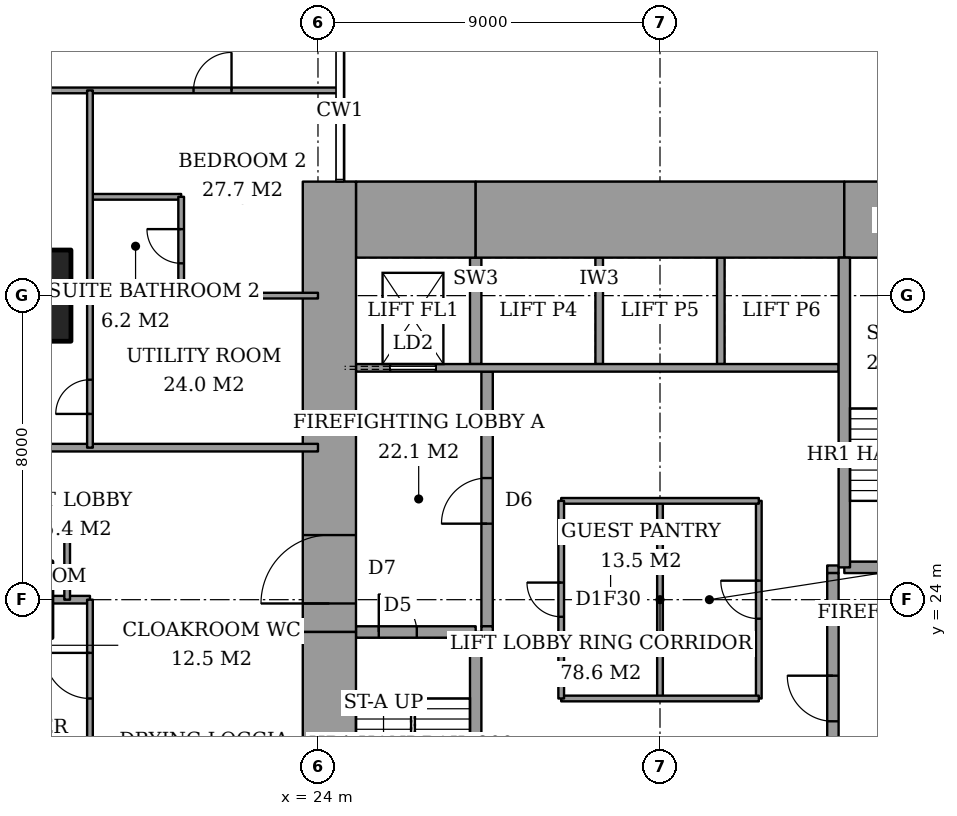
"""IFC4 building model, lengths in metres.
Left out: names, types, materials, properties, quantities, classifications, styles, units other than length and angle.
Written with IfcOpenShell. Run it as: python <this file> out.ifc"""

import sys

from ifc_helpers import new_model, si_unit, direction, frame, frame_2d, origin, origin_2d, place, context, subcontext, project, spatial, rectangle, extrude, element, fill, save


model = new_model("IFC4")
c1 = context("Model", 3, precision=1e-05, world=origin(), true_north=direction((0.0, 1.0)))
c2 = subcontext(c1, "Body", "Model", "MODEL_VIEW")
j1 = project(units=[si_unit("LENGTHUNIT", "METRE"), si_unit("PLANEANGLEUNIT", "RADIAN")], contexts=[c1])
p1 = place(None, origin())
s1 = spatial("IfcSite", under=j1, at=p1, CompositionType="ELEMENT")
p2 = place(p1, origin())
s2 = spatial("IfcBuilding", under=s1, at=p2, CompositionType="ELEMENT")
p3 = place(p2, frame((0.0, 0.0, 83.6)))
s3 = spatial("IfcBuildingStorey", under=s2, at=p3, CompositionType="ELEMENT", Elevation=83.6)
p4 = place(p3, frame((16.0, 32.0, 0.0), z_axis=(0.0, 0.0, 1.0), x_axis=(1.0, 0.0, 0.0)))
e1 = element("IfcColumn", 1, at=p4, inside=s3, PredefinedType="COLUMN", context=c2, shape_type="SweptSolid", body=[
    extrude(rectangle(XDim=3.0, YDim=2.4, at=origin_2d()), origin(), (0.0, 0.0, 1.0), 3.6),
])
p5 = place(p3, frame((25.0, 34.0, 0.0), z_axis=(0.0, 0.0, 1.0), x_axis=(1.0, 0.0, 0.0)))
e2 = element("IfcWall", 2, at=p5, inside=s3, PredefinedType="SHEAR", context=c2, shape_type="SweptSolid", body=[
    extrude(rectangle(XDim=3.15, YDim=2.0, at=frame_2d((1.575, 0.0))), origin(), (0.0, 0.0, 1.0), 3.6),
])
p6 = place(p3, frame((28.15, 34.0, 0.0), z_axis=(0.0, 0.0, 1.0), x_axis=(1.0, 0.0, 0.0)))
e3 = element("IfcWall", 3, at=p6, inside=s3, PredefinedType="SHEAR", context=c2, shape_type="SweptSolid", body=[
    extrude(rectangle(XDim=9.7, YDim=2.0, at=frame_2d((4.85, 0.0))), origin(), (0.0, 0.0, 1.0), 3.6),
])
p7 = place(p3, frame((37.85, 34.0, 0.0), z_axis=(0.0, 0.0, 1.0), x_axis=(1.0, 0.0, 0.0)))
e4 = element("IfcWall", 4, at=p7, inside=s3, PredefinedType="SHEAR", context=c2, shape_type="SweptSolid", body=[
    extrude(rectangle(XDim=3.15, YDim=2.0, at=frame_2d((1.575, 0.0))), origin(), (0.0, 0.0, 1.0), 3.6),
])
p8 = place(p3, frame((24.3, 13.0, 0.0), z_axis=(0.0, 0.0, 1.0), x_axis=(0.0, 1.0, 0.0)))
e5 = element("IfcWall", 5, at=p8, inside=s3, PredefinedType="SHEAR", context=c2, shape_type="SweptSolid", body=[
    extrude(rectangle(XDim=10.15, YDim=1.4, at=frame_2d((5.075, 0.0))), origin(), (0.0, 0.0, 1.0), 3.6),
])
p9 = place(p3, frame((24.3, 23.15, 0.0), z_axis=(0.0, 0.0, 1.0), x_axis=(0.0, 1.0, 0.0)))
e6 = element("IfcWall", 6, at=p9, inside=s3, PredefinedType="SHEAR", context=c2, shape_type="SweptSolid", body=[
    extrude(rectangle(XDim=11.85, YDim=1.4, at=frame_2d((5.925, 0.0))), origin(), (0.0, 0.0, 1.0), 3.6),
])
p10 = place(p9, frame((0.75, 0.0, 0.0)))
e7 = element("IfcOpeningElement", 7, at=p10, cuts=e6, PredefinedType="OPENING", context=c2, shape_type="SweptSolid", body=[
    extrude(rectangle(XDim=1.8, YDim=2.4, at=frame_2d((0.9, 1.2))), frame((0.0, 0.71, 0.0), z_axis=(0.0, -1.0, 0.0), x_axis=(1.0, 0.0, 0.0)), (0.0, 0.0, 1.0), 1.42),
])
p11 = place(p3, frame((28.15, 15.0, 0.0), z_axis=(0.0, 0.0, 1.0), x_axis=(0.0, 1.0, 0.0)))
e8 = element("IfcWall", 8, at=p11, inside=s3, PredefinedType="SHEAR", context=c2, shape_type="SweptSolid", body=[
    extrude(rectangle(XDim=8.15, YDim=0.3, at=frame_2d((4.075, 0.0))), origin(), (0.0, 0.0, 1.0), 3.6),
])
p12 = place(p3, frame((25.0, 23.15, 0.0), z_axis=(0.0, 0.0, 1.0), x_axis=(1.0, 0.0, 0.0)))
e9 = element("IfcWall", 9, at=p12, inside=s3, PredefinedType="SHEAR", context=c2, shape_type="SweptSolid", body=[
    extrude(rectangle(XDim=3.15, YDim=0.3, at=frame_2d((1.575, 0.0))), origin(), (0.0, 0.0, 1.0), 3.6),
])
p13 = place(p12, frame((0.6, 0.0, 0.0)))
e10 = element("IfcOpeningElement", 10, at=p13, cuts=e9, PredefinedType="OPENING", context=c2, shape_type="SweptSolid", body=[
    extrude(rectangle(XDim=1.0, YDim=2.1, at=frame_2d((0.5, 1.05))), frame((0.0, 0.16, 0.0), z_axis=(0.0, -1.0, 0.0), x_axis=(1.0, 0.0, 0.0)), (0.0, 0.0, 1.0), 0.32),
])
p14 = place(p3, frame((37.85, 24.85, 0.0), z_axis=(0.0, 0.0, 1.0), x_axis=(0.0, 1.0, 0.0)))
e11 = element("IfcWall", 11, at=p14, inside=s3, PredefinedType="SHEAR", context=c2, shape_type="SweptSolid", body=[
    extrude(rectangle(XDim=8.15, YDim=0.3, at=frame_2d((4.075, 0.0))), origin(), (0.0, 0.0, 1.0), 3.6),
])
p15 = place(p3, frame((37.85, 24.85, 0.0), z_axis=(0.0, 0.0, 1.0), x_axis=(1.0, 0.0, 0.0)))
e12 = element("IfcWall", 12, at=p15, inside=s3, PredefinedType="SHEAR", context=c2, shape_type="SweptSolid", body=[
    extrude(rectangle(XDim=3.15, YDim=0.3, at=frame_2d((1.575, 0.0))), origin(), (0.0, 0.0, 1.0), 3.6),
])
p16 = place(p15, frame((0.95, 0.0, 0.0)))
e13 = element("IfcOpeningElement", 13, at=p16, cuts=e12, PredefinedType="OPENING", context=c2, shape_type="SweptSolid", body=[
    extrude(rectangle(XDim=1.0, YDim=2.1, at=frame_2d((0.5, 1.05))), frame((0.0, 0.16, 0.0), z_axis=(0.0, -1.0, 0.0), x_axis=(1.0, 0.0, 0.0)), (0.0, 0.0, 1.0), 0.32),
])
p17 = place(p3, frame((28.45, 23.3, 0.0), z_axis=(0.0, 0.0, 1.0), x_axis=(0.0, 1.0, 0.0)))
e14 = element("IfcWall", 14, at=p17, inside=s3, PredefinedType="PARTITIONING", context=c2, shape_type="SweptSolid", body=[
    extrude(rectangle(XDim=6.7, YDim=0.3, at=frame_2d((3.35, 0.0))), origin(), (0.0, 0.0, 1.0), 3.6),
])
p18 = place(p17, frame((2.7, 0.0, 0.0)))
e15 = element("IfcOpeningElement", 15, at=p18, cuts=e14, PredefinedType="OPENING", context=c2, shape_type="SweptSolid", body=[
    extrude(rectangle(XDim=1.2, YDim=2.1, at=frame_2d((0.6, 1.05))), frame((0.0, 0.16, 0.0), z_axis=(0.0, -1.0, 0.0), x_axis=(1.0, 0.0, 0.0)), (0.0, 0.0, 1.0), 0.32),
])
p19 = place(p3, frame((37.55, 18.0, 0.0), z_axis=(0.0, 0.0, 1.0), x_axis=(0.0, 1.0, 0.0)))
e16 = element("IfcWall", 16, at=p19, inside=s3, PredefinedType="PARTITIONING", context=c2, shape_type="SweptSolid", body=[
    extrude(rectangle(XDim=6.7, YDim=0.3, at=frame_2d((3.35, 0.0))), origin(), (0.0, 0.0, 1.0), 3.6),
])
p20 = place(p19, frame((2.8, 0.0, 0.0)))
e17 = element("IfcOpeningElement", 17, at=p20, cuts=e16, PredefinedType="OPENING", context=c2, shape_type="SweptSolid", body=[
    extrude(rectangle(XDim=1.2, YDim=2.1, at=frame_2d((0.6, 1.05))), frame((0.0, 0.16, 0.0), z_axis=(0.0, -1.0, 0.0), x_axis=(1.0, 0.0, 0.0)), (0.0, 0.0, 1.0), 0.32),
])
p21 = place(p3, frame((17.0, 24.0, 0.0), z_axis=(0.0, 0.0, 1.0), x_axis=(1.0, 0.0, 0.0)))
e18 = element("IfcWall", 18, at=p21, inside=s3, PredefinedType="PARTITIONING", context=c2, shape_type="SweptSolid", body=[
    extrude(rectangle(XDim=1.0, YDim=0.2, at=frame_2d((0.5, 0.0))), origin(), (0.0, 0.0, 1.0), 3.35),
])
p22 = place(p3, frame((12.6, 25.6, 0.0), z_axis=(0.0, 0.0, 1.0), x_axis=(1.0, 0.0, 0.0)))
e19 = element("IfcWall", 19, at=p22, inside=s3, PredefinedType="PARTITIONING", context=c2, shape_type="SweptSolid", body=[
    extrude(rectangle(XDim=4.8, YDim=0.15, at=frame_2d((2.4, 0.0))), origin(), (0.0, 0.0, 1.0), 3.35),
])
p23 = place(p22, frame((1.65, 0.0, 0.0)))
e20 = element("IfcOpeningElement", 20, at=p23, cuts=e19, PredefinedType="OPENING", context=c2, shape_type="SweptSolid", body=[
    extrude(rectangle(XDim=0.9, YDim=2.1, at=frame_2d((0.45, 1.05))), frame((0.0, 0.085, 0.0), z_axis=(0.0, -1.0, 0.0), x_axis=(1.0, 0.0, 0.0)), (0.0, 0.0, 1.0), 0.17),
])
p24 = place(p3, frame((6.725, 28.0, 0.0), z_axis=(0.0, 0.0, 1.0), x_axis=(1.0, 0.0, 0.0)))
e21 = element("IfcWall", 21, at=p24, inside=s3, PredefinedType="PARTITIONING", context=c2, shape_type="SweptSolid", body=[
    extrude(rectangle(XDim=17.275, YDim=0.2, at=frame_2d((8.637, 0.0))), origin(), (0.0, 0.0, 1.0), 3.35),
])
p25 = place(p24, frame((6.675, 0.0, 0.0)))
e22 = element("IfcOpeningElement", 22, at=p25, cuts=e21, PredefinedType="OPENING", context=c2, shape_type="SweptSolid", body=[
    extrude(rectangle(XDim=1.2, YDim=2.4, at=frame_2d((0.6, 1.2))), frame((0.0, 0.11, 0.0), z_axis=(0.0, -1.0, 0.0), x_axis=(1.0, 0.0, 0.0)), (0.0, 0.0, 1.0), 0.22),
])
p26 = place(p3, frame((18.0, 32.0, 0.0), z_axis=(0.0, 0.0, 1.0), x_axis=(1.0, 0.0, 0.0)))
e23 = element("IfcWall", 23, at=p26, inside=s3, PredefinedType="PARTITIONING", context=c2, shape_type="SweptSolid", body=[
    extrude(rectangle(XDim=6.0, YDim=0.15, at=frame_2d((3.0, 0.0))), origin(), (0.0, 0.0, 1.0), 2.634),
])
p27 = place(p3, frame((17.5, 32.1, 0.0), z_axis=(0.0, 0.0, 1.0), x_axis=(1.0, 0.0, 0.0)))
e24 = element("IfcWall", 24, at=p27, inside=s3, PredefinedType="PARTITIONING", context=c2, shape_type="SweptSolid", body=[
    extrude(rectangle(XDim=0.5, YDim=0.15, at=frame_2d((0.25, 0.0))), origin(), (0.0, 0.0, 1.0), 2.634),
])
p28 = place(p3, frame((18.0, 34.6, 0.0), z_axis=(0.0, 0.0, 1.0), x_axis=(1.0, 0.0, 0.0)))
e25 = element("IfcWall", 25, at=p28, inside=s3, PredefinedType="PARTITIONING", context=c2, shape_type="SweptSolid", body=[
    extrude(rectangle(XDim=2.4, YDim=0.15, at=frame_2d((1.2, 0.0))), origin(), (0.0, 0.0, 1.0), 3.35),
])
p29 = place(p3, frame((10.0, 37.4, 0.0), z_axis=(0.0, 0.0, 1.0), x_axis=(1.0, 0.0, 0.0)))
e26 = element("IfcWall", 26, at=p29, inside=s3, PredefinedType="PARTITIONING", context=c2, shape_type="SweptSolid", body=[
    extrude(rectangle(XDim=14.561, YDim=0.15, at=frame_2d((7.281, 0.0))), origin(), (0.0, 0.0, 1.0), 3.35),
])
p30 = place(p29, frame((0.6, 0.0, 0.0)))
e27 = element("IfcOpeningElement", 27, at=p30, cuts=e26, PredefinedType="OPENING", context=c2, shape_type="SweptSolid", body=[
    extrude(rectangle(XDim=1.0, YDim=2.1, at=frame_2d((0.5, 1.05))), frame((0.0, 0.085, 0.0), z_axis=(0.0, -1.0, 0.0), x_axis=(1.0, 0.0, 0.0)), (0.0, 0.0, 1.0), 0.17),
])
p31 = place(p29, frame((4.6, 0.0, 0.0)))
e28 = element("IfcOpeningElement", 28, at=p31, cuts=e26, PredefinedType="OPENING", context=c2, shape_type="SweptSolid", body=[
    extrude(rectangle(XDim=1.0, YDim=2.1, at=frame_2d((0.5, 1.05))), frame((0.0, 0.085, 0.0), z_axis=(0.0, -1.0, 0.0), x_axis=(1.0, 0.0, 0.0)), (0.0, 0.0, 1.0), 0.17),
])
p32 = place(p29, frame((10.725, 0.0, 0.0)))
e29 = element("IfcOpeningElement", 29, at=p32, cuts=e26, PredefinedType="OPENING", context=c2, shape_type="SweptSolid", body=[
    extrude(rectangle(XDim=1.0, YDim=2.1, at=frame_2d((0.5, 1.05))), frame((0.0, 0.085, 0.0), z_axis=(0.0, -1.0, 0.0), x_axis=(1.0, 0.0, 0.0)), (0.0, 0.0, 1.0), 0.17),
])
p33 = place(p3, frame((17.4, 24.0, 0.0), z_axis=(0.0, 0.0, 1.0), x_axis=(0.0, 1.0, 0.0)))
e30 = element("IfcWall", 30, at=p33, inside=s3, PredefinedType="PARTITIONING", context=c2, shape_type="SweptSolid", body=[
    extrude(rectangle(XDim=1.6, YDim=0.15, at=frame_2d((0.8, 0.0))), origin(), (0.0, 0.0, 1.0), 3.35),
])
p34 = place(p3, frame((18.0, 10.6, 0.0), z_axis=(0.0, 0.0, 1.0), x_axis=(0.0, 1.0, 0.0)))
e31 = element("IfcWall", 31, at=p34, inside=s3, PredefinedType="PARTITIONING", context=c2, shape_type="SweptSolid", body=[
    extrude(rectangle(XDim=13.4, YDim=0.15, at=frame_2d((6.7, 0.0))), origin(), (0.0, 0.0, 1.0), 3.35),
])
p35 = place(p34, frame((10.8, 0.0, 0.0)))
e32 = element("IfcOpeningElement", 32, at=p35, cuts=e31, PredefinedType="OPENING", context=c2, shape_type="SweptSolid", body=[
    extrude(rectangle(XDim=1.2, YDim=2.4, at=frame_2d((0.6, 1.2))), frame((0.0, 0.085, 0.0), z_axis=(0.0, -1.0, 0.0), x_axis=(1.0, 0.0, 0.0)), (0.0, 0.0, 1.0), 0.17),
])
p36 = place(p34, frame((7.25, 0.0, 0.0)))
e33 = element("IfcOpeningElement", 33, at=p36, cuts=e31, PredefinedType="OPENING", context=c2, shape_type="SweptSolid", body=[
    extrude(rectangle(XDim=0.9, YDim=2.1, at=frame_2d((0.45, 1.05))), frame((0.0, 0.085, 0.0), z_axis=(0.0, -1.0, 0.0), x_axis=(1.0, 0.0, 0.0)), (0.0, 0.0, 1.0), 0.17),
])
p37 = place(p3, frame((18.0, 28.0, 0.0), z_axis=(0.0, 0.0, 1.0), x_axis=(0.0, 1.0, 0.0)))
e34 = element("IfcWall", 34, at=p37, inside=s3, PredefinedType="PARTITIONING", context=c2, shape_type="SweptSolid", body=[
    extrude(rectangle(XDim=9.4, YDim=0.15, at=frame_2d((4.7, 0.0))), origin(), (0.0, 0.0, 1.0), 3.35),
])
p38 = place(p37, frame((0.887, 0.0, 0.0)))
e35 = element("IfcOpeningElement", 35, at=p38, cuts=e34, PredefinedType="OPENING", context=c2, shape_type="SweptSolid", body=[
    extrude(rectangle(XDim=0.9, YDim=2.1, at=frame_2d((0.45, 1.05))), frame((0.0, 0.085, 0.0), z_axis=(0.0, -1.0, 0.0), x_axis=(1.0, 0.0, 0.0)), (0.0, 0.0, 1.0), 0.17),
])
p39 = place(p3, frame((20.4, 32.0, 0.0), z_axis=(0.0, 0.0, 1.0), x_axis=(0.0, 1.0, 0.0)))
e36 = element("IfcWall", 36, at=p39, inside=s3, PredefinedType="PARTITIONING", context=c2, shape_type="SweptSolid", body=[
    extrude(rectangle(XDim=2.6, YDim=0.15, at=frame_2d((1.3, 0.0))), origin(), (0.0, 0.0, 1.0), 3.35),
])
p40 = place(p39, frame((0.85, 0.0, 0.0)))
e37 = element("IfcOpeningElement", 37, at=p40, cuts=e36, PredefinedType="OPENING", context=c2, shape_type="SweptSolid", body=[
    extrude(rectangle(XDim=0.9, YDim=2.1, at=frame_2d((0.45, 1.05))), frame((0.0, 0.085, 0.0), z_axis=(0.0, -1.0, 0.0), x_axis=(1.0, 0.0, 0.0)), (0.0, 0.0, 1.0), 0.17),
])
p41 = place(p3, frame((25.0, 30.1, 0.0), z_axis=(0.0, 0.0, 1.0), x_axis=(1.0, 0.0, 0.0)))
e38 = element("IfcWall", 38, at=p41, inside=s3, PredefinedType="PARTITIONING", context=c2, shape_type="SweptSolid", body=[
    extrude(rectangle(XDim=12.7, YDim=0.2, at=frame_2d((6.35, 0.0))), origin(), (0.0, 0.0, 1.0), 3.6),
])
p42 = place(p41, frame((0.9, 0.0, 0.0)))
e39 = element("IfcOpeningElement", 39, at=p42, cuts=e38, PredefinedType="OPENING", context=c2, shape_type="SweptSolid", body=[
    extrude(rectangle(XDim=1.2, YDim=2.1, at=frame_2d((0.6, 1.05))), frame((0.0, 0.11, 0.0), z_axis=(0.0, -1.0, 0.0), x_axis=(1.0, 0.0, 0.0)), (0.0, 0.0, 1.0), 0.22),
])
for number, where, z_axis, x_axis in (
    (40, (31.4, 30.2, 0.0), (0.0, 0.0, 1.0), (0.0, 1.0, 0.0)),
    (41, (34.6, 30.2, 0.0), (0.0, 0.0, 1.0), (0.0, 1.0, 0.0)),
):
    element("IfcWall", number, at=place(p3, frame(where, z_axis=z_axis, x_axis=x_axis)), inside=s3, PredefinedType="PARTITIONING", context=c2, shape_type="SweptSolid", body=[
        extrude(rectangle(XDim=2.8, YDim=0.2, at=frame_2d((1.4, 0.0))), origin(), (0.0, 0.0, 1.0), 3.6),
    ])
p43 = place(p3, frame((28.15, 30.2, 0.0), z_axis=(0.0, 0.0, 1.0), x_axis=(0.0, 1.0, 0.0)))
e42 = element("IfcWall", 42, at=p43, inside=s3, PredefinedType="SHEAR", context=c2, shape_type="SweptSolid", body=[
    extrude(rectangle(XDim=2.8, YDim=0.3, at=frame_2d((1.4, 0.0))), origin(), (0.0, 0.0, 1.0), 3.6),
])
for number, where, z_axis, x_axis in (
    (43, (28.3, 23.2, 0.0), (0.0, 0.0, 1.0), (1.0, 0.0, 0.0)),
    (44, (37.4, 24.8, 0.0), (0.0, 0.0, 1.0), (1.0, 0.0, 0.0)),
):
    element("IfcWall", number, at=place(p3, frame(where, z_axis=z_axis, x_axis=x_axis)), inside=s3, PredefinedType="PARTITIONING", context=c2, shape_type="SweptSolid", body=[
        extrude(rectangle(XDim=0.3, YDim=0.2, at=frame_2d((0.15, 0.0))), origin(), (0.0, 0.0, 1.0), 3.6),
    ])
for number, where, z_axis, x_axis in (
    (45, (30.4, 21.4, 0.0), (0.0, 0.0, 1.0), (1.0, 0.0, 0.0)),
    (46, (30.4, 26.6, 0.0), (0.0, 0.0, 1.0), (1.0, 0.0, 0.0)),
):
    element("IfcWall", number, at=place(p3, frame(where, z_axis=z_axis, x_axis=x_axis)), inside=s3, PredefinedType="PARTITIONING", context=c2, shape_type="SweptSolid", body=[
        extrude(rectangle(XDim=5.2, YDim=0.15, at=frame_2d((2.6, 0.0))), origin(), (0.0, 0.0, 1.0), 3.35),
    ])
p44 = place(p3, frame((30.4, 21.4, 0.0), z_axis=(0.0, 0.0, 1.0), x_axis=(0.0, 1.0, 0.0)))
e47 = element("IfcWall", 47, at=p44, inside=s3, PredefinedType="PARTITIONING", context=c2, shape_type="SweptSolid", body=[
    extrude(rectangle(XDim=5.2, YDim=0.15, at=frame_2d((2.6, 0.0))), origin(), (0.0, 0.0, 1.0), 3.35),
])
p45 = place(p44, frame((2.15, 0.0, 0.0)))
e48 = element("IfcOpeningElement", 48, at=p45, cuts=e47, PredefinedType="OPENING", context=c2, shape_type="SweptSolid", body=[
    extrude(rectangle(XDim=0.9, YDim=2.1, at=frame_2d((0.45, 1.05))), frame((0.0, 0.085, 0.0), z_axis=(0.0, -1.0, 0.0), x_axis=(1.0, 0.0, 0.0)), (0.0, 0.0, 1.0), 0.17),
])
p46 = place(p3, frame((35.6, 21.4, 0.0), z_axis=(0.0, 0.0, 1.0), x_axis=(0.0, 1.0, 0.0)))
e49 = element("IfcWall", 49, at=p46, inside=s3, PredefinedType="PARTITIONING", context=c2, shape_type="SweptSolid", body=[
    extrude(rectangle(XDim=5.2, YDim=0.15, at=frame_2d((2.6, 0.0))), origin(), (0.0, 0.0, 1.0), 3.35),
])
p47 = place(p46, frame((2.1, 0.0, 0.0)))
e50 = element("IfcOpeningElement", 50, at=p47, cuts=e49, PredefinedType="OPENING", context=c2, shape_type="SweptSolid", body=[
    extrude(rectangle(XDim=1.0, YDim=2.1, at=frame_2d((0.5, 1.05))), frame((0.0, 0.085, 0.0), z_axis=(0.0, -1.0, 0.0), x_axis=(1.0, 0.0, 0.0)), (0.0, 0.0, 1.0), 0.17),
])
p48 = place(p3, frame((33.0, 21.4, 0.0), z_axis=(0.0, 0.0, 1.0), x_axis=(0.0, 1.0, 0.0)))
e51 = element("IfcWall", 51, at=p48, inside=s3, PredefinedType="PARTITIONING", context=c2, shape_type="SweptSolid", body=[
    extrude(rectangle(XDim=5.2, YDim=0.15, at=frame_2d((2.6, 0.0))), origin(), (0.0, 0.0, 1.0), 3.35),
])
p49 = place(p35, origin())
e52 = element("IfcDoor", 52, at=p49, inside=s3, OperationType="SINGLE_SWING_LEFT", PredefinedType="DOOR", context=c2, shape_type="SweptSolid", body=[
    extrude(rectangle(XDim=1.2, YDim=2.4, at=frame_2d((0.6, 1.2))), frame((0.0, 0.025, 0.0), z_axis=(0.0, -1.0, 0.0), x_axis=(1.0, 0.0, 0.0)), (0.0, 0.0, 1.0), 0.05),
])
fill(e32, e52)
p50 = place(p40, origin())
e53 = element("IfcDoor", 53, at=p50, inside=s3, OperationType="SINGLE_SWING_LEFT", PredefinedType="DOOR", context=c2, shape_type="SweptSolid", body=[
    extrude(rectangle(XDim=0.9, YDim=2.1, at=frame_2d((0.45, 1.05))), frame((0.0, 0.025, 0.0), z_axis=(0.0, -1.0, 0.0), x_axis=(1.0, 0.0, 0.0)), (0.0, 0.0, 1.0), 0.05),
])
fill(e37, e53)
p51 = place(p32, origin())
e54 = element("IfcDoor", 54, at=p51, inside=s3, OperationType="SINGLE_SWING_LEFT", PredefinedType="DOOR", context=c2, shape_type="SweptSolid", body=[
    extrude(rectangle(XDim=1.0, YDim=2.1, at=frame_2d((0.5, 1.05))), frame((0.0, 0.025, 0.0), z_axis=(0.0, -1.0, 0.0), x_axis=(1.0, 0.0, 0.0)), (0.0, 0.0, 1.0), 0.05),
])
fill(e29, e54)
p52 = place(p38, origin())
e55 = element("IfcDoor", 55, at=p52, inside=s3, OperationType="SINGLE_SWING_RIGHT", PredefinedType="DOOR", context=c2, shape_type="SweptSolid", body=[
    extrude(rectangle(XDim=0.9, YDim=2.1, at=frame_2d((0.45, 1.05))), frame((0.0, 0.025, 0.0), z_axis=(0.0, -1.0, 0.0), x_axis=(1.0, 0.0, 0.0)), (0.0, 0.0, 1.0), 0.05),
])
fill(e35, e55)
p53 = place(p13, origin())
e56 = element("IfcDoor", 56, at=p53, inside=s3, OperationType="SINGLE_SWING_RIGHT", PredefinedType="DOOR", context=c2, shape_type="SweptSolid", body=[
    extrude(rectangle(XDim=1.0, YDim=2.1, at=frame_2d((0.5, 1.05))), frame((0.0, 0.025, 0.0), z_axis=(0.0, -1.0, 0.0), x_axis=(1.0, 0.0, 0.0)), (0.0, 0.0, 1.0), 0.05),
])
fill(e10, e56)
p54 = place(p18, origin())
e57 = element("IfcDoor", 57, at=p54, inside=s3, OperationType="SINGLE_SWING_RIGHT", PredefinedType="DOOR", context=c2, shape_type="SweptSolid", body=[
    extrude(rectangle(XDim=1.2, YDim=2.1, at=frame_2d((0.6, 1.05))), frame((0.0, 0.025, 0.0), z_axis=(0.0, -1.0, 0.0), x_axis=(1.0, 0.0, 0.0)), (0.0, 0.0, 1.0), 0.05),
])
fill(e15, e57)
p55 = place(p20, origin())
e58 = element("IfcDoor", 58, at=p55, inside=s3, OperationType="SINGLE_SWING_LEFT", PredefinedType="DOOR", context=c2, shape_type="SweptSolid", body=[
    extrude(rectangle(XDim=1.2, YDim=2.1, at=frame_2d((0.6, 1.05))), frame((0.0, 0.025, 0.0), z_axis=(0.0, -1.0, 0.0), x_axis=(1.0, 0.0, 0.0)), (0.0, 0.0, 1.0), 0.05),
])
fill(e17, e58)
p56 = place(p10, origin())
e59 = element("IfcDoor", 59, at=p56, inside=s3, OperationType="DOUBLE_DOOR_DOUBLE_SWING", PredefinedType="DOOR", context=c2, shape_type="SweptSolid", body=[
    extrude(rectangle(XDim=1.8, YDim=2.4, at=frame_2d((0.9, 1.2))), frame((0.0, 0.025, 0.0), z_axis=(0.0, -1.0, 0.0), x_axis=(1.0, 0.0, 0.0)), (0.0, 0.0, 1.0), 0.05),
])
fill(e7, e59)
p57 = place(p45, origin())
e60 = element("IfcDoor", 60, at=p57, inside=s3, OperationType="SINGLE_SWING_LEFT", PredefinedType="DOOR", context=c2, shape_type="SweptSolid", body=[
    extrude(rectangle(XDim=0.9, YDim=2.1, at=frame_2d((0.45, 1.05))), frame((0.0, 0.025, 0.0), z_axis=(0.0, -1.0, 0.0), x_axis=(1.0, 0.0, 0.0)), (0.0, 0.0, 1.0), 0.05),
])
fill(e48, e60)
p58 = place(p47, origin())
e61 = element("IfcDoor", 61, at=p58, inside=s3, OperationType="SINGLE_SWING_LEFT", PredefinedType="DOOR", context=c2, shape_type="SweptSolid", body=[
    extrude(rectangle(XDim=1.0, YDim=2.1, at=frame_2d((0.5, 1.05))), frame((0.0, 0.025, 0.0), z_axis=(0.0, -1.0, 0.0), x_axis=(1.0, 0.0, 0.0)), (0.0, 0.0, 1.0), 0.05),
])
fill(e50, e61)
p59 = place(p42, origin())
e62 = element("IfcDoor", 62, at=p59, inside=s3, OperationType="SLIDING_TO_LEFT", PredefinedType="DOOR", context=c2, shape_type="SweptSolid", body=[
    extrude(rectangle(XDim=1.2, YDim=2.1, at=frame_2d((0.6, 1.05))), frame((0.0, 0.025, 0.0), z_axis=(0.0, -1.0, 0.0), x_axis=(1.0, 0.0, 0.0)), (0.0, 0.0, 1.0), 0.05),
])
fill(e39, e62)
save(model, sys.argv[1])
